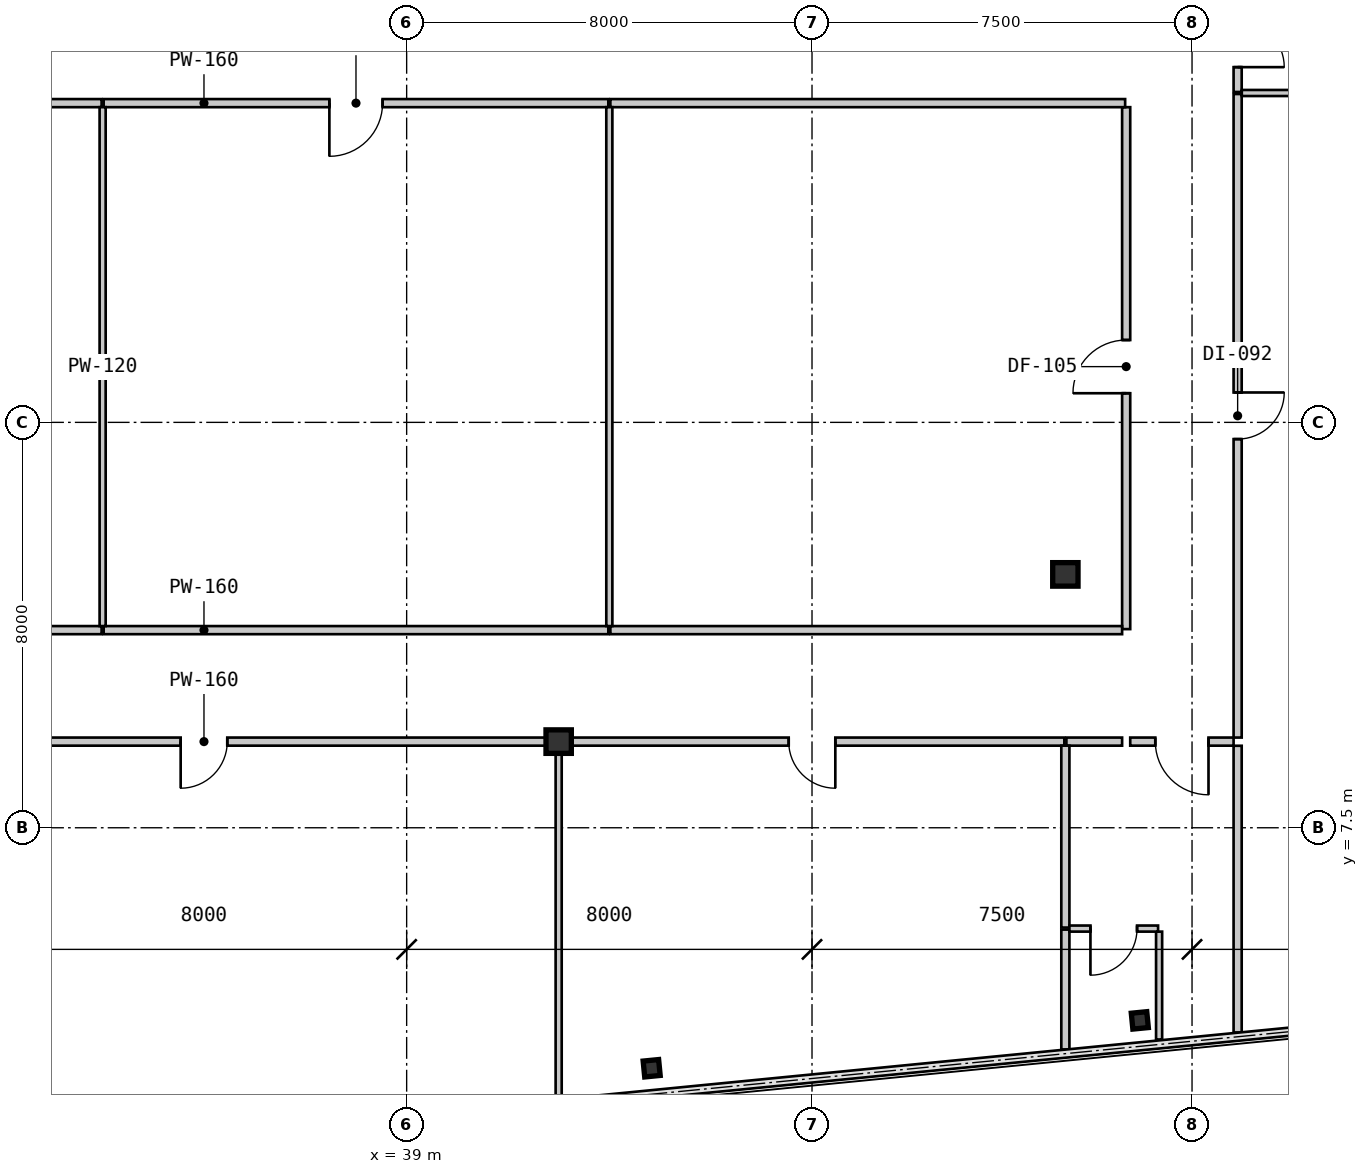
"""IFC4 building model, lengths in metres.
Left out: names, types, materials, properties, quantities, classifications, styles, units other than length and angle.
Written with IfcOpenShell. Run it as: python <this file> out.ifc"""

import sys

from ifc_helpers import new_model, si_unit, direction, frame, frame_2d, origin, origin_2d, place, context, subcontext, project, spatial, rectangle, i_section, extrude, source, transform, mapped, element, fill, save


model = new_model("IFC4")
c1 = context("Model", 3, precision=1e-05, world=origin(), true_north=direction((0.0, 1.0)))
c2 = subcontext(c1, "Body", "Model", "MODEL_VIEW")
j1 = project(units=[si_unit("LENGTHUNIT", "METRE"), si_unit("PLANEANGLEUNIT", "RADIAN")], contexts=[c1])
p1 = place(None, origin())
s1 = spatial("IfcSite", under=j1, at=p1, CompositionType="ELEMENT")
p2 = place(p1, origin())
s2 = spatial("IfcBuilding", under=s1, at=p2, CompositionType="ELEMENT")
p3 = place(p2, frame((0.0, 0.0, 80.85)))
s3 = spatial("IfcBuildingStorey", under=s2, at=p3, CompositionType="ELEMENT", Elevation=80.85)
m1 = source(origin(), c2, "Body", "SweptSolid", [
    extrude(i_section(OverallWidth=0.5, OverallDepth=0.464, WebThickness=0.022, FlangeThickness=0.034, at=origin_2d()), origin(), (0.0, 0.0, 1.0), 3.15),
])
for number, where, z_axis, x_axis in (
    (1, (42.0, 9.2, 0.0), (0.0, 0.0, 1.0), (1.0, 0.0, 0.0)),
    (2, (52.0, 12.5, 0.0), (0.0, 0.0, 1.0), (1.0, 0.0, 0.0)),
):
    element("IfcColumn", number, at=place(p3, frame(where, z_axis=z_axis, x_axis=x_axis)), inside=s3, PredefinedType="COLUMN", context=c2, shape_type="MappedRepresentation", body=[
        mapped(m1, transform((0.0, 0.0, 0.0), scale=1.0)),
    ])
m2 = source(origin(), c2, "Body", "SweptSolid", [
    extrude(i_section(OverallWidth=0.307, OverallDepth=0.315, WebThickness=0.012, FlangeThickness=0.019, at=origin_2d()), origin(), (0.0, 0.0, 1.0), 3.15),
])
for number, where, z_axis, x_axis in (
    (3, (43.835, 2.754, 0.0), (0.0, 0.0, 1.0), (0.995, 0.098, 0.0)),
    (4, (53.469, 3.698, 0.0), (0.0, 0.0, 1.0), (0.995, 0.098, 0.0)),
):
    element("IfcColumn", number, at=place(p3, frame(where, z_axis=z_axis, x_axis=x_axis)), inside=s3, PredefinedType="COLUMN", context=c2, shape_type="MappedRepresentation", body=[
        mapped(m2, transform((0.0, 0.0, 0.0), scale=1.0)),
    ])
m3 = source(origin(), c2, "Body", "SweptSolid", [
    extrude(rectangle(XDim=16.159, YDim=0.16, at=frame_2d((8.08, 0.0))), origin(), (0.0, 0.0, 1.0), 2.93),
])
p4 = place(p3, frame((32.98, 21.8, 0.0), z_axis=(0.0, 0.0, 1.0), x_axis=(-1.0, 0.0, 0.0)))
e5 = element("IfcWall", 5, at=p4, inside=s3, PredefinedType="PARTITIONING", context=c2, shape_type="MappedRepresentation", body=[
    mapped(m3, transform((0.0, 0.0, 0.0), scale=1.0)),
])
m4 = source(origin(), c2, "Body", "SweptSolid", [
    extrude(rectangle(XDim=0.92, YDim=2.1, at=frame_2d((0.46, 1.05))), frame((0.0, 0.09, 0.0), z_axis=(0.0, -1.0, 0.0), x_axis=(1.0, 0.0, 0.0)), (0.0, 0.0, 1.0), 0.18),
])
p5 = place(p4, frame((7.62, 0.0, 0.0)))
e6 = element("IfcOpeningElement", 6, at=p5, cuts=e5, PredefinedType="OPENING", context=c2, shape_type="MappedRepresentation", body=[
    mapped(m4, transform((0.0, 0.0, 0.0), scale=1.0)),
])
m5 = source(origin(), c2, "Body", "SweptSolid", [
    extrude(rectangle(XDim=9.959, YDim=0.16, at=frame_2d((4.98, 0.0))), origin(), (0.0, 0.0, 1.0), 2.93),
])
p6 = place(p3, frame((42.98, 21.8, 0.0), z_axis=(0.0, 0.0, 1.0), x_axis=(-1.0, 0.0, 0.0)))
e7 = element("IfcWall", 7, at=p6, inside=s3, PredefinedType="PARTITIONING", context=c2, shape_type="MappedRepresentation", body=[
    mapped(m5, transform((0.0, 0.0, 0.0), scale=1.0)),
])
m6 = source(origin(), c2, "Body", "SweptSolid", [
    extrude(rectangle(XDim=1.05, YDim=2.1, at=frame_2d((0.525, 1.05))), frame((0.0, 0.09, 0.0), z_axis=(0.0, -1.0, 0.0), x_axis=(1.0, 0.0, 0.0)), (0.0, 0.0, 1.0), 0.18),
])
p7 = place(p6, frame((4.455, 0.0, 0.0)))
e8 = element("IfcOpeningElement", 8, at=p7, cuts=e7, PredefinedType="OPENING", context=c2, shape_type="MappedRepresentation", body=[
    mapped(m6, transform((0.0, 0.0, 0.0), scale=1.0)),
])
m7 = source(origin(), c2, "Body", "SweptSolid", [
    extrude(rectangle(XDim=10.3, YDim=0.16, at=frame_2d((5.15, 0.0))), origin(), (0.0, 0.0, 1.0), 2.93),
])
p8 = place(p3, frame((53.2, 11.42, 0.0), z_axis=(0.0, 0.0, 1.0), x_axis=(0.0, 1.0, 0.0)))
e9 = element("IfcWall", 9, at=p8, inside=s3, PredefinedType="PARTITIONING", context=c2, shape_type="MappedRepresentation", body=[
    mapped(m7, transform((0.0, 0.0, 0.0), scale=1.0)),
])
p9 = place(p8, frame((4.655, 0.0, 0.0)))
e10 = element("IfcOpeningElement", 10, at=p9, cuts=e9, PredefinedType="OPENING", context=c2, shape_type="MappedRepresentation", body=[
    mapped(m6, transform((0.0, 0.0, 0.0), scale=1.0)),
])
m8 = source(origin(), c2, "Body", "SweptSolid", [
    extrude(rectangle(XDim=10.159, YDim=0.16, at=frame_2d((5.08, 0.0))), origin(), (0.0, 0.0, 1.0), 2.93),
])
p10 = place(p3, frame((53.18, 21.8, 0.0), z_axis=(0.0, 0.0, 1.0), x_axis=(-1.0, 0.0, 0.0)))
e11 = element("IfcWall", 11, at=p10, inside=s3, PredefinedType="PARTITIONING", context=c2, shape_type="MappedRepresentation", body=[
    mapped(m8, transform((0.0, 0.0, 0.0), scale=1.0)),
])
m9 = source(origin(), c2, "Body", "SweptSolid", [
    extrude(rectangle(XDim=2.04, YDim=0.16, at=frame_2d((1.02, 0.0))), origin(), (0.0, 0.0, 1.0), 2.93),
])
p11 = place(p3, frame((55.32, 9.2, 0.0), z_axis=(0.0, 0.0, 1.0), x_axis=(-1.0, 0.0, 0.0)))
e12 = element("IfcWall", 12, at=p11, inside=s3, PredefinedType="PARTITIONING", context=c2, shape_type="MappedRepresentation", body=[
    mapped(m9, transform((0.0, 0.0, 0.0), scale=1.0)),
])
p12 = place(p11, frame((0.495, 0.0, 0.0)))
e13 = element("IfcOpeningElement", 13, at=p12, cuts=e12, PredefinedType="OPENING", context=c2, shape_type="MappedRepresentation", body=[
    mapped(m6, transform((0.0, 0.0, 0.0), scale=1.0)),
])
m10 = source(origin(), c2, "Body", "SweptSolid", [
    extrude(rectangle(XDim=12.7, YDim=0.16, at=frame_2d((6.35, 0.0))), origin(), (0.0, 0.0, 1.0), 2.93),
])
p13 = place(p3, frame((55.4, 21.98, 0.0), z_axis=(0.0, 0.0, 1.0), x_axis=(0.0, -1.0, 0.0)))
e14 = element("IfcWall", 14, at=p13, inside=s3, PredefinedType="PARTITIONING", context=c2, shape_type="MappedRepresentation", body=[
    mapped(m10, transform((0.0, 0.0, 0.0), scale=1.0)),
])
p14 = place(p13, frame((5.89, 0.0, 0.0)))
e15 = element("IfcOpeningElement", 15, at=p14, cuts=e14, PredefinedType="OPENING", context=c2, shape_type="MappedRepresentation", body=[
    mapped(m4, transform((0.0, 0.0, 0.0), scale=1.0)),
])
m11 = source(origin(), c2, "Body", "SweptSolid", [
    extrude(rectangle(XDim=1.9, YDim=0.16, at=frame_2d((0.95, 0.0))), origin(), (0.0, 0.0, 1.0), 2.93),
])
p15 = place(p3, frame((55.4, 23.92, 0.0), z_axis=(0.0, 0.0, 1.0), x_axis=(0.0, -1.0, 0.0)))
e16 = element("IfcWall", 16, at=p15, inside=s3, PredefinedType="PARTITIONING", context=c2, shape_type="MappedRepresentation", body=[
    mapped(m11, transform((0.0, 0.0, 0.0), scale=1.0)),
])
p16 = place(p15, frame((0.49, 0.0, 0.0)))
e17 = element("IfcOpeningElement", 17, at=p16, cuts=e16, PredefinedType="OPENING", context=c2, shape_type="MappedRepresentation", body=[
    mapped(m4, transform((0.0, 0.0, 0.0), scale=1.0)),
])
m12 = source(origin(), c2, "Body", "SweptSolid", [
    extrude(rectangle(XDim=16.1, YDim=0.16, at=frame_2d((8.05, 0.0))), origin(), (0.0, 0.0, 1.0), 2.93),
])
p17 = place(p3, frame((16.88, 11.4, 0.0), z_axis=(0.0, 0.0, 1.0), x_axis=(1.0, 0.0, 0.0)))
e18 = element("IfcWall", 18, at=p17, inside=s3, PredefinedType="PARTITIONING", context=c2, shape_type="MappedRepresentation", body=[
    mapped(m12, transform((0.0, 0.0, 0.0), scale=1.0)),
])
p18 = place(p3, frame((33.02, 11.4, 0.0), z_axis=(0.0, 0.0, 1.0), x_axis=(1.0, 0.0, 0.0)))
e19 = element("IfcWall", 19, at=p18, inside=s3, PredefinedType="PARTITIONING", context=c2, shape_type="MappedRepresentation", body=[
    mapped(m5, transform((0.0, 0.0, 0.0), scale=1.0)),
])
m13 = source(origin(), c2, "Body", "SweptSolid", [
    extrude(rectangle(XDim=10.1, YDim=0.16, at=frame_2d((5.05, 0.0))), origin(), (0.0, 0.0, 1.0), 2.93),
])
p19 = place(p3, frame((43.02, 11.4, 0.0), z_axis=(0.0, 0.0, 1.0), x_axis=(1.0, 0.0, 0.0)))
e20 = element("IfcWall", 20, at=p19, inside=s3, PredefinedType="PARTITIONING", context=c2, shape_type="MappedRepresentation", body=[
    mapped(m13, transform((0.0, 0.0, 0.0), scale=1.0)),
])
m14 = source(origin(), c2, "Body", "SweptSolid", [
    extrude(rectangle(XDim=13.959, YDim=0.16, at=frame_2d((6.98, 0.0))), origin(), (0.0, 0.0, 1.0), 2.328),
])
p20 = place(p3, frame((41.98, 9.2, 0.0), z_axis=(0.0, 0.0, 1.0), x_axis=(-1.0, 0.0, 0.0)))
e21 = element("IfcWall", 21, at=p20, inside=s3, PredefinedType="PARTITIONING", context=c2, shape_type="MappedRepresentation", body=[
    mapped(m14, transform((0.0, 0.0, 0.0), scale=1.0)),
])
p21 = place(p20, frame((6.52, 0.0, 0.0)))
e22 = element("IfcOpeningElement", 22, at=p21, cuts=e21, PredefinedType="OPENING", context=c2, shape_type="MappedRepresentation", body=[
    mapped(m4, transform((0.0, 0.0, 0.0), scale=1.0)),
])
p22 = place(p3, frame((51.98, 9.2, 0.0), z_axis=(0.0, 0.0, 1.0), x_axis=(-1.0, 0.0, 0.0)))
e23 = element("IfcWall", 23, at=p22, inside=s3, PredefinedType="PARTITIONING", context=c2, shape_type="MappedRepresentation", body=[
    mapped(m5, transform((0.0, 0.0, 0.0), scale=1.0)),
])
p23 = place(p22, frame((4.52, 0.0, 0.0)))
e24 = element("IfcOpeningElement", 24, at=p23, cuts=e23, PredefinedType="OPENING", context=c2, shape_type="MappedRepresentation", body=[
    mapped(m4, transform((0.0, 0.0, 0.0), scale=1.0)),
])
m15 = source(origin(), c2, "Body", "SweptSolid", [
    extrude(rectangle(XDim=1.1, YDim=0.16, at=frame_2d((0.55, 0.0))), origin(), (0.0, 0.0, 1.0), 2.93),
])
p24 = place(p3, frame((53.12, 9.2, 0.0), z_axis=(0.0, 0.0, 1.0), x_axis=(-1.0, 0.0, 0.0)))
e25 = element("IfcWall", 25, at=p24, inside=s3, PredefinedType="PARTITIONING", context=c2, shape_type="MappedRepresentation", body=[
    mapped(m15, transform((0.0, 0.0, 0.0), scale=1.0)),
])
m16 = source(origin(), c2, "Body", "SweptSolid", [
    extrude(rectangle(XDim=10.24, YDim=0.12, at=frame_2d((5.12, 0.0))), origin(), (0.0, 0.0, 1.0), 2.93),
])
for number, where, z_axis, x_axis in (
    (26, (33.0, 21.72, 0.0), (0.0, 0.0, 1.0), (0.0, -1.0, 0.0)),
    (27, (43.0, 21.72, 0.0), (0.0, 0.0, 1.0), (0.0, -1.0, 0.0)),
):
    element("IfcWall", number, at=place(p3, frame(where, z_axis=z_axis, x_axis=x_axis)), inside=s3, PredefinedType="PARTITIONING", context=c2, shape_type="MappedRepresentation", body=[
        mapped(m16, transform((0.0, 0.0, 0.0), scale=1.0)),
    ])
m17 = source(origin(), c2, "Body", "SweptSolid", [
    extrude(rectangle(XDim=6.976, YDim=0.12, at=frame_2d((3.488, 0.0))), origin(), (0.0, 0.0, 1.0), 2.93),
])
p25 = place(p3, frame((42.0, 9.12, 0.0), z_axis=(0.0, 0.0, 1.0), x_axis=(0.0, -1.0, 0.0)))
e28 = element("IfcWall", 28, at=p25, inside=s3, PredefinedType="PARTITIONING", context=c2, shape_type="MappedRepresentation", body=[
    mapped(m17, transform((0.0, 0.0, 0.0), scale=1.0)),
])
m18 = source(origin(), c2, "Body", "SweptSolid", [
    extrude(rectangle(XDim=3.59, YDim=0.16, at=frame_2d((1.795, 0.0))), origin(), (0.0, 0.0, 1.0), 2.93),
])
p26 = place(p3, frame((52.0, 9.12, 0.0), z_axis=(0.0, 0.0, 1.0), x_axis=(0.0, -1.0, 0.0)))
e29 = element("IfcWall", 29, at=p26, inside=s3, PredefinedType="PARTITIONING", context=c2, shape_type="MappedRepresentation", body=[
    mapped(m18, transform((0.0, 0.0, 0.0), scale=1.0)),
])
m19 = source(origin(), c2, "Body", "SweptSolid", [
    extrude(rectangle(XDim=2.365, YDim=0.16, at=frame_2d((1.183, 0.0))), origin(), (0.0, 0.0, 1.0), 2.93),
])
p27 = place(p3, frame((52.0, 5.49, 0.0), z_axis=(0.0, 0.0, 1.0), x_axis=(0.0, -1.0, 0.0)))
e30 = element("IfcWall", 30, at=p27, inside=s3, PredefinedType="PARTITIONING", context=c2, shape_type="MappedRepresentation", body=[
    mapped(m19, transform((0.0, 0.0, 0.0), scale=1.0)),
])
m20 = source(origin(), c2, "Body", "SweptSolid", [
    extrude(rectangle(XDim=2.128, YDim=0.12, at=frame_2d((1.064, 0.0))), origin(), (0.0, 0.0, 1.0), 2.93),
])
p28 = place(p3, frame((53.85, 3.322, 0.0), z_axis=(0.0, 0.0, 1.0), x_axis=(0.0, 1.0, 0.0)))
e31 = element("IfcWall", 31, at=p28, inside=s3, PredefinedType="PARTITIONING", context=c2, shape_type="MappedRepresentation", body=[
    mapped(m20, transform((0.0, 0.0, 0.0), scale=1.0)),
])
m21 = source(origin(), c2, "Body", "SweptSolid", [
    extrude(rectangle(XDim=1.75, YDim=0.12, at=frame_2d((0.875, 0.0))), origin(), (0.0, 0.0, 1.0), 2.93),
])
p29 = place(p3, frame((53.83, 5.51, 0.0), z_axis=(0.0, 0.0, 1.0), x_axis=(-1.0, 0.0, 0.0)))
e32 = element("IfcWall", 32, at=p29, inside=s3, PredefinedType="PARTITIONING", context=c2, shape_type="MappedRepresentation", body=[
    mapped(m21, transform((0.0, 0.0, 0.0), scale=1.0)),
])
m22 = source(origin(), c2, "Body", "SweptSolid", [
    extrude(rectangle(XDim=0.92, YDim=2.1, at=frame_2d((0.46, 1.05))), frame((0.0, 0.07, 0.0), z_axis=(0.0, -1.0, 0.0), x_axis=(1.0, 0.0, 0.0)), (0.0, 0.0, 1.0), 0.14),
])
p30 = place(p29, frame((0.415, 0.0, 0.0)))
e33 = element("IfcOpeningElement", 33, at=p30, cuts=e32, PredefinedType="OPENING", context=c2, shape_type="MappedRepresentation", body=[
    mapped(m22, transform((0.0, 0.0, 0.0), scale=1.0)),
])
m23 = source(origin(), c2, "Body", "SweptSolid", [
    extrude(rectangle(XDim=5.658, YDim=0.16, at=frame_2d((2.829, 0.0))), origin(), (0.0, 0.0, 1.0), 2.93),
])
p31 = place(p3, frame((55.4, 9.118, 0.0), z_axis=(0.0, 0.0, 1.0), x_axis=(0.0, -1.0, 0.0)))
e34 = element("IfcWall", 34, at=p31, inside=s3, PredefinedType="PARTITIONING", context=c2, shape_type="MappedRepresentation", body=[
    mapped(m23, transform((0.0, 0.0, 0.0), scale=1.0)),
])
m24 = source(origin(), c2, "Body", "SweptSolid", [
    extrude(rectangle(XDim=7.709, YDim=0.12, at=frame_2d((3.854, 0.0))), origin(), (0.0, 0.0, 1.0), 2.93),
])
p32 = place(p3, frame((55.482, 22.0, 0.0), z_axis=(0.0, 0.0, 1.0), x_axis=(1.0, 0.0, 0.0)))
e35 = element("IfcWall", 35, at=p32, inside=s3, PredefinedType="PARTITIONING", context=c2, shape_type="MappedRepresentation", body=[
    mapped(m24, transform((0.0, 0.0, 0.0), scale=1.0)),
])
m25 = source(origin(), c2, "Body", "SweptSolid", [
    extrude(rectangle(XDim=1.05, YDim=2.1, at=frame_2d((0.525, 1.05))), frame((0.0, 0.025, 0.0), z_axis=(0.0, -1.0, 0.0), x_axis=(1.0, 0.0, 0.0)), (0.0, 0.0, 1.0), 0.05),
])
p33 = place(p7, origin())
e36 = element("IfcDoor", 36, at=p33, inside=s3, OperationType="SINGLE_SWING_RIGHT", PredefinedType="DOOR", context=c2, shape_type="MappedRepresentation", body=[
    mapped(m25, transform((0.0, 0.0, 0.0), scale=1.0)),
])
fill(e8, e36)
p34 = place(p9, origin())
e37 = element("IfcDoor", 37, at=p34, inside=s3, OperationType="SINGLE_SWING_LEFT", PredefinedType="DOOR", context=c2, shape_type="MappedRepresentation", body=[
    mapped(m25, transform((0.0, 0.0, 0.0), scale=1.0)),
])
fill(e10, e37)
p35 = place(p12, origin())
e38 = element("IfcDoor", 38, at=p35, inside=s3, OperationType="SINGLE_SWING_LEFT", PredefinedType="DOOR", context=c2, shape_type="MappedRepresentation", body=[
    mapped(m25, transform((0.0, 0.0, 0.0), scale=1.0)),
])
fill(e13, e38)
m26 = source(origin(), c2, "Body", "SweptSolid", [
    extrude(rectangle(XDim=0.92, YDim=2.1, at=frame_2d((0.46, 1.05))), frame((0.0, 0.025, 0.0), z_axis=(0.0, -1.0, 0.0), x_axis=(1.0, 0.0, 0.0)), (0.0, 0.0, 1.0), 0.05),
])
p36 = place(p14, origin())
e39 = element("IfcDoor", 39, at=p36, inside=s3, OperationType="SINGLE_SWING_LEFT", PredefinedType="DOOR", context=c2, shape_type="MappedRepresentation", body=[
    mapped(m26, transform((0.0, 0.0, 0.0), scale=1.0)),
])
fill(e15, e39)
p37 = place(p16, origin())
e40 = element("IfcDoor", 40, at=p37, inside=s3, OperationType="SINGLE_SWING_RIGHT", PredefinedType="DOOR", context=c2, shape_type="MappedRepresentation", body=[
    mapped(m26, transform((0.0, 0.0, 0.0), scale=1.0)),
])
fill(e17, e40)
p38 = place(p21, origin())
e41 = element("IfcDoor", 41, at=p38, inside=s3, OperationType="SINGLE_SWING_RIGHT", PredefinedType="DOOR", context=c2, shape_type="MappedRepresentation", body=[
    mapped(m26, transform((0.0, 0.0, 0.0), scale=1.0)),
])
fill(e22, e41)
p39 = place(p23, origin())
e42 = element("IfcDoor", 42, at=p39, inside=s3, OperationType="SINGLE_SWING_LEFT", PredefinedType="DOOR", context=c2, shape_type="MappedRepresentation", body=[
    mapped(m26, transform((0.0, 0.0, 0.0), scale=1.0)),
])
fill(e24, e42)
p40 = place(p30, origin())
e43 = element("IfcDoor", 43, at=p40, inside=s3, OperationType="SINGLE_SWING_RIGHT", PredefinedType="DOOR", context=c2, shape_type="MappedRepresentation", body=[
    mapped(m26, transform((0.0, 0.0, 0.0), scale=1.0)),
])
fill(e33, e43)
save(model, sys.argv[1])
